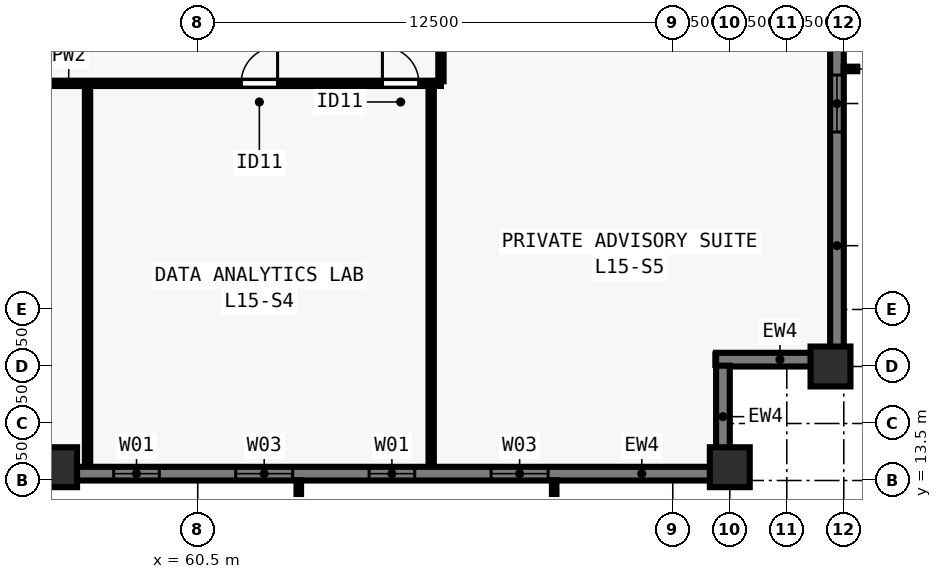
"""IFC4 building model, lengths in metres.
Left out: names, types, materials, properties, quantities, classifications, styles, units other than length and angle.
Written with IfcOpenShell. Run it as: python <this file> out.ifc"""

import sys

from ifc_helpers import new_model, si_unit, direction, frame, frame_2d, origin, origin_2d, place, context, subcontext, project, spatial, rectangle, extrude, element, fill, save


model = new_model("IFC4")
c1 = context("Model", 3, precision=1e-05, world=origin(), true_north=direction((0.0, 1.0)))
c2 = subcontext(c1, "Body", "Model", "MODEL_VIEW")
j1 = project(units=[si_unit("LENGTHUNIT", "METRE"), si_unit("PLANEANGLEUNIT", "RADIAN")], contexts=[c1])
p1 = place(None, origin())
s1 = spatial("IfcSite", under=j1, at=p1, CompositionType="ELEMENT")
p2 = place(p1, origin())
s2 = spatial("IfcBuilding", under=s1, at=p2, CompositionType="ELEMENT")
p3 = place(p2, frame((0.0, 0.0, 58.5)))
s3 = spatial("IfcBuildingStorey", under=s2, at=p3, CompositionType="ELEMENT", Elevation=58.5)
for number, where, z_axis, x_axis in (
    (1, (56.8, 13.85, 0.0), (0.0, 0.0, 1.0), (1.0, 0.0, 0.0)),
    (2, (74.5, 13.85, 0.0), (0.0, 0.0, 1.0), (1.0, 0.0, 0.0)),
    (3, (77.15, 16.5, 0.0), (0.0, 0.0, 1.0), (0.0, 1.0, 0.0)),
):
    element("IfcColumn", number, at=place(p3, frame(where, z_axis=z_axis, x_axis=x_axis)), inside=s3, PredefinedType="COLUMN", context=c2, shape_type="SweptSolid", body=[
        extrude(rectangle(XDim=1.05, YDim=1.05, at=origin_2d()), origin(), (0.0, 0.0, 1.0), 3.5),
    ])
p4 = place(p3, frame((77.32, 27.4, 0.0), z_axis=(0.0, 0.0, 1.0), x_axis=(0.0, -1.0, 0.0)))
e4 = element("IfcWall", 4, at=p4, inside=s3, PredefinedType="SOLIDWALL", context=c2, shape_type="SweptSolid", body=[
    extrude(rectangle(XDim=10.562, YDim=0.36, at=frame_2d((5.281, 0.0))), origin(), (0.0, 0.0, 1.0), 3.28),
])
p5 = place(p4, frame((3.231, 0.0, 0.8)))
e5 = element("IfcOpeningElement", 5, at=p5, cuts=e4, PredefinedType="OPENING", context=c2, shape_type="SweptSolid", body=[
    extrude(rectangle(XDim=1.5, YDim=1.544, at=frame_2d((0.75, 0.772))), frame((0.0, 0.19, 0.0), z_axis=(0.0, -1.0, 0.0), x_axis=(1.0, 0.0, 0.0)), (0.0, 0.0, 1.0), 0.38),
])
p6 = place(p3, frame((77.5, 16.68, 0.0), z_axis=(0.0, 0.0, 1.0), x_axis=(-1.0, 0.0, 0.0)))
e6 = element("IfcWall", 6, at=p6, inside=s3, PredefinedType="SOLIDWALL", context=c2, shape_type="SweptSolid", body=[
    extrude(rectangle(XDim=3.36, YDim=0.36, at=frame_2d((1.68, 0.0))), origin(), (0.0, 0.0, 1.0), 3.28),
])
p7 = place(p3, frame((74.32, 16.522, 0.0), z_axis=(0.0, 0.0, 1.0), x_axis=(0.0, -1.0, 0.0)))
e7 = element("IfcWall", 7, at=p7, inside=s3, PredefinedType="SOLIDWALL", context=c2, shape_type="SweptSolid", body=[
    extrude(rectangle(XDim=2.684, YDim=0.36, at=frame_2d((1.342, 0.0))), origin(), (0.0, 0.0, 1.0), 3.28),
])
p8 = place(p3, frame((74.5, 13.68, 0.0), z_axis=(0.0, 0.0, 1.0), x_axis=(-1.0, 0.0, 0.0)))
e8 = element("IfcWall", 8, at=p8, inside=s3, PredefinedType="SOLIDWALL", context=c2, shape_type="SweptSolid", body=[
    extrude(rectangle(XDim=44.662, YDim=0.36, at=frame_2d((22.331, 0.0))), origin(), (0.0, 0.0, 1.0), 3.28),
])
p9 = place(p8, frame((4.78, 0.0, 0.8)))
e9 = element("IfcOpeningElement", 9, at=p9, cuts=e8, PredefinedType="OPENING", context=c2, shape_type="SweptSolid", body=[
    extrude(rectangle(XDim=1.5, YDim=1.544, at=frame_2d((0.75, 0.772))), frame((0.0, 0.19, 0.0), z_axis=(0.0, -1.0, 0.0), x_axis=(1.0, 0.0, 0.0)), (0.0, 0.0, 1.0), 0.38),
])
p10 = place(p8, frame((8.29, 0.0, 0.8)))
e10 = element("IfcOpeningElement", 10, at=p10, cuts=e8, PredefinedType="OPENING", context=c2, shape_type="SweptSolid", body=[
    extrude(rectangle(XDim=1.2, YDim=1.544, at=frame_2d((0.6, 0.772))), frame((0.0, 0.19, 0.0), z_axis=(0.0, -1.0, 0.0), x_axis=(1.0, 0.0, 0.0)), (0.0, 0.0, 1.0), 0.38),
])
p11 = place(p8, frame((11.5, 0.0, 0.8)))
e11 = element("IfcOpeningElement", 11, at=p11, cuts=e8, PredefinedType="OPENING", context=c2, shape_type="SweptSolid", body=[
    extrude(rectangle(XDim=1.5, YDim=1.544, at=frame_2d((0.75, 0.772))), frame((0.0, 0.19, 0.0), z_axis=(0.0, -1.0, 0.0), x_axis=(1.0, 0.0, 0.0)), (0.0, 0.0, 1.0), 0.38),
])
p12 = place(p8, frame((15.01, 0.0, 0.8)))
e12 = element("IfcOpeningElement", 12, at=p12, cuts=e8, PredefinedType="OPENING", context=c2, shape_type="SweptSolid", body=[
    extrude(rectangle(XDim=1.2, YDim=1.544, at=frame_2d((0.6, 0.772))), frame((0.0, 0.19, 0.0), z_axis=(0.0, -1.0, 0.0), x_axis=(1.0, 0.0, 0.0)), (0.0, 0.0, 1.0), 0.38),
])
p13 = place(p8, frame((18.671, 0.0, 0.8)))
e13 = element("IfcOpeningElement", 13, at=p13, cuts=e8, PredefinedType="OPENING", context=c2, shape_type="SweptSolid", body=[
    extrude(rectangle(XDim=1.5, YDim=1.544, at=frame_2d((0.75, 0.772))), frame((0.0, 0.19, 0.0), z_axis=(0.0, -1.0, 0.0), x_axis=(1.0, 0.0, 0.0)), (0.0, 0.0, 1.0), 0.38),
])
p14 = place(p8, frame((21.731, 0.0, 0.8)))
e14 = element("IfcOpeningElement", 14, at=p14, cuts=e8, PredefinedType="OPENING", context=c2, shape_type="SweptSolid", body=[
    extrude(rectangle(XDim=1.2, YDim=1.544, at=frame_2d((0.6, 0.772))), frame((0.0, 0.19, 0.0), z_axis=(0.0, -1.0, 0.0), x_axis=(1.0, 0.0, 0.0)), (0.0, 0.0, 1.0), 0.38),
])
p15 = place(p8, frame((24.941, 0.0, 0.8)))
e15 = element("IfcOpeningElement", 15, at=p15, cuts=e8, PredefinedType="OPENING", context=c2, shape_type="SweptSolid", body=[
    extrude(rectangle(XDim=1.5, YDim=1.544, at=frame_2d((0.75, 0.772))), frame((0.0, 0.19, 0.0), z_axis=(0.0, -1.0, 0.0), x_axis=(1.0, 0.0, 0.0)), (0.0, 0.0, 1.0), 0.38),
])
p16 = place(p8, frame((28.451, 0.0, 0.8)))
e16 = element("IfcOpeningElement", 16, at=p16, cuts=e8, PredefinedType="OPENING", context=c2, shape_type="SweptSolid", body=[
    extrude(rectangle(XDim=1.2, YDim=1.544, at=frame_2d((0.6, 0.772))), frame((0.0, 0.19, 0.0), z_axis=(0.0, -1.0, 0.0), x_axis=(1.0, 0.0, 0.0)), (0.0, 0.0, 1.0), 0.38),
])
p17 = place(p8, frame((31.662, 0.0, 0.8)))
e17 = element("IfcOpeningElement", 17, at=p17, cuts=e8, PredefinedType="OPENING", context=c2, shape_type="SweptSolid", body=[
    extrude(rectangle(XDim=1.5, YDim=1.544, at=frame_2d((0.75, 0.772))), frame((0.0, 0.19, 0.0), z_axis=(0.0, -1.0, 0.0), x_axis=(1.0, 0.0, 0.0)), (0.0, 0.0, 1.0), 0.38),
])
p18 = place(p8, frame((35.172, 0.0, 0.8)))
e18 = element("IfcOpeningElement", 18, at=p18, cuts=e8, PredefinedType="OPENING", context=c2, shape_type="SweptSolid", body=[
    extrude(rectangle(XDim=1.2, YDim=1.544, at=frame_2d((0.6, 0.772))), frame((0.0, 0.19, 0.0), z_axis=(0.0, -1.0, 0.0), x_axis=(1.0, 0.0, 0.0)), (0.0, 0.0, 1.0), 0.38),
])
p19 = place(p8, frame((38.382, 0.0, 0.8)))
e19 = element("IfcOpeningElement", 19, at=p19, cuts=e8, PredefinedType="OPENING", context=c2, shape_type="SweptSolid", body=[
    extrude(rectangle(XDim=1.5, YDim=1.544, at=frame_2d((0.75, 0.772))), frame((0.0, 0.19, 0.0), z_axis=(0.0, -1.0, 0.0), x_axis=(1.0, 0.0, 0.0)), (0.0, 0.0, 1.0), 0.38),
])
p20 = place(p3, frame((37.1, 23.95, 0.0), z_axis=(0.0, 0.0, 1.0), x_axis=(1.0, 0.0, 0.0)))
e20 = element("IfcWall", 20, at=p20, inside=s3, PredefinedType="PARTITIONING", context=c2, shape_type="SweptSolid", body=[
    extrude(rectangle(XDim=29.8, YDim=0.14, at=frame_2d((14.9, 0.0))), origin(), (0.0, 0.0, 1.0), 3.28),
])
p21 = place(p20, frame((4.191, 0.0, 0.0)))
e21 = element("IfcOpeningElement", 21, at=p21, cuts=e20, PredefinedType="OPENING", context=c2, shape_type="SweptSolid", body=[
    extrude(rectangle(XDim=0.96, YDim=2.12, at=frame_2d((0.48, 1.06))), frame((0.0, 0.08, 0.0), z_axis=(0.0, -1.0, 0.0), x_axis=(1.0, 0.0, 0.0)), (0.0, 0.0, 1.0), 0.16),
])
p22 = place(p20, frame((5.358, 0.0, 0.0)))
e22 = element("IfcOpeningElement", 22, at=p22, cuts=e20, PredefinedType="OPENING", context=c2, shape_type="SweptSolid", body=[
    extrude(rectangle(XDim=0.96, YDim=2.12, at=frame_2d((0.48, 1.06))), frame((0.0, 0.08, 0.0), z_axis=(0.0, -1.0, 0.0), x_axis=(1.0, 0.0, 0.0)), (0.0, 0.0, 1.0), 0.16),
])
p23 = place(p20, frame((14.51, 0.0, 0.0)))
e23 = element("IfcOpeningElement", 23, at=p23, cuts=e20, PredefinedType="OPENING", context=c2, shape_type="SweptSolid", body=[
    extrude(rectangle(XDim=0.96, YDim=2.12, at=frame_2d((0.48, 1.06))), frame((0.0, 0.08, 0.0), z_axis=(0.0, -1.0, 0.0), x_axis=(1.0, 0.0, 0.0)), (0.0, 0.0, 1.0), 0.16),
])
p24 = place(p20, frame((24.542, 0.0, 0.0)))
e24 = element("IfcOpeningElement", 24, at=p24, cuts=e20, PredefinedType="OPENING", context=c2, shape_type="SweptSolid", body=[
    extrude(rectangle(XDim=0.96, YDim=2.12, at=frame_2d((0.48, 1.06))), frame((0.0, 0.08, 0.0), z_axis=(0.0, -1.0, 0.0), x_axis=(1.0, 0.0, 0.0)), (0.0, 0.0, 1.0), 0.16),
])
p25 = place(p20, frame((28.26, 0.0, 0.0)))
e25 = element("IfcOpeningElement", 25, at=p25, cuts=e20, PredefinedType="OPENING", context=c2, shape_type="SweptSolid", body=[
    extrude(rectangle(XDim=0.96, YDim=2.12, at=frame_2d((0.48, 1.06))), frame((0.0, 0.08, 0.0), z_axis=(0.0, -1.0, 0.0), x_axis=(1.0, 0.0, 0.0)), (0.0, 0.0, 1.0), 0.16),
])
p26 = place(p3, frame((66.9, 24.005, 0.0), z_axis=(0.0, 0.0, 1.0), x_axis=(0.0, 1.0, 0.0)))
e26 = element("IfcWall", 26, at=p26, inside=s3, PredefinedType="PARTITIONING", context=c2, shape_type="SweptSolid", body=[
    extrude(rectangle(XDim=29.99, YDim=0.14, at=frame_2d((14.995, 0.0))), origin(), (0.0, 0.0, 1.0), 3.28),
])
p27 = place(p26, frame((4.344, 0.0, 0.0)))
e27 = element("IfcOpeningElement", 27, at=p27, cuts=e26, PredefinedType="OPENING", context=c2, shape_type="SweptSolid", body=[
    extrude(rectangle(XDim=0.96, YDim=2.12, at=frame_2d((0.48, 1.06))), frame((0.0, 0.08, 0.0), z_axis=(0.0, -1.0, 0.0), x_axis=(1.0, 0.0, 0.0)), (0.0, 0.0, 1.0), 0.16),
])
p28 = place(p26, frame((14.452, 0.0, 0.0)))
e28 = element("IfcOpeningElement", 28, at=p28, cuts=e26, PredefinedType="OPENING", context=c2, shape_type="SweptSolid", body=[
    extrude(rectangle(XDim=0.96, YDim=2.12, at=frame_2d((0.48, 1.06))), frame((0.0, 0.08, 0.0), z_axis=(0.0, -1.0, 0.0), x_axis=(1.0, 0.0, 0.0)), (0.0, 0.0, 1.0), 0.16),
])
p29 = place(p26, frame((24.623, 0.0, 0.0)))
e29 = element("IfcOpeningElement", 29, at=p29, cuts=e26, PredefinedType="OPENING", context=c2, shape_type="SweptSolid", body=[
    extrude(rectangle(XDim=0.96, YDim=2.12, at=frame_2d((0.48, 1.06))), frame((0.0, 0.08, 0.0), z_axis=(0.0, -1.0, 0.0), x_axis=(1.0, 0.0, 0.0)), (0.0, 0.0, 1.0), 0.16),
])
p30 = place(p3, frame((57.601, 13.92, 0.0), z_axis=(0.0, 0.0, 1.0), x_axis=(0.0, 1.0, 0.0)))
e30 = element("IfcWall", 30, at=p30, inside=s3, PredefinedType="PARTITIONING", context=c2, shape_type="SweptSolid", body=[
    extrude(rectangle(XDim=9.93, YDim=0.14, at=frame_2d((4.965, 0.0))), origin(), (0.0, 0.0, 1.0), 3.28),
])
p31 = place(p3, frame((66.643, 13.92, 0.0), z_axis=(0.0, 0.0, 1.0), x_axis=(0.0, 1.0, 0.0)))
e31 = element("IfcWall", 31, at=p31, inside=s3, PredefinedType="PARTITIONING", context=c2, shape_type="SweptSolid", body=[
    extrude(rectangle(XDim=9.93, YDim=0.14, at=frame_2d((4.965, 0.0))), origin(), (0.0, 0.0, 1.0), 2.439),
])
p32 = place(p5, origin())
e32 = element("IfcWindow", 32, at=p32, inside=s3, PartitioningType="SINGLE_PANEL", PredefinedType="WINDOW", context=c2, shape_type="SweptSolid", body=[
    extrude(rectangle(XDim=1.5, YDim=1.544, at=frame_2d((0.75, 0.772))), frame((0.0, -0.05, 0.0), z_axis=(0.0, -1.0, 0.0), x_axis=(1.0, 0.0, 0.0)), (0.0, 0.0, 1.0), 0.06),
])
fill(e5, e32)
p33 = place(p9, origin())
e33 = element("IfcWindow", 33, at=p33, inside=s3, PartitioningType="SINGLE_PANEL", PredefinedType="WINDOW", context=c2, shape_type="SweptSolid", body=[
    extrude(rectangle(XDim=1.5, YDim=1.544, at=frame_2d((0.75, 0.772))), frame((0.0, -0.05, 0.0), z_axis=(0.0, -1.0, 0.0), x_axis=(1.0, 0.0, 0.0)), (0.0, 0.0, 1.0), 0.06),
])
fill(e9, e33)
p34 = place(p10, origin())
e34 = element("IfcWindow", 34, at=p34, inside=s3, PartitioningType="SINGLE_PANEL", PredefinedType="WINDOW", context=c2, shape_type="SweptSolid", body=[
    extrude(rectangle(XDim=1.2, YDim=1.544, at=frame_2d((0.6, 0.772))), frame((0.0, -0.05, 0.0), z_axis=(0.0, -1.0, 0.0), x_axis=(1.0, 0.0, 0.0)), (0.0, 0.0, 1.0), 0.06),
])
fill(e10, e34)
p35 = place(p11, origin())
e35 = element("IfcWindow", 35, at=p35, inside=s3, PartitioningType="SINGLE_PANEL", PredefinedType="WINDOW", context=c2, shape_type="SweptSolid", body=[
    extrude(rectangle(XDim=1.5, YDim=1.544, at=frame_2d((0.75, 0.772))), frame((0.0, -0.05, 0.0), z_axis=(0.0, -1.0, 0.0), x_axis=(1.0, 0.0, 0.0)), (0.0, 0.0, 1.0), 0.06),
])
fill(e11, e35)
p36 = place(p12, origin())
e36 = element("IfcWindow", 36, at=p36, inside=s3, PartitioningType="SINGLE_PANEL", PredefinedType="WINDOW", context=c2, shape_type="SweptSolid", body=[
    extrude(rectangle(XDim=1.2, YDim=1.544, at=frame_2d((0.6, 0.772))), frame((0.0, -0.05, 0.0), z_axis=(0.0, -1.0, 0.0), x_axis=(1.0, 0.0, 0.0)), (0.0, 0.0, 1.0), 0.06),
])
fill(e12, e36)
p37 = place(p24, origin())
e37 = element("IfcDoor", 37, at=p37, inside=s3, OperationType="SINGLE_SWING_RIGHT", PredefinedType="DOOR", context=c2, shape_type="SweptSolid", body=[
    extrude(rectangle(XDim=0.96, YDim=2.12, at=frame_2d((0.48, 1.06))), frame((0.0, 0.025, 0.0), z_axis=(0.0, -1.0, 0.0), x_axis=(1.0, 0.0, 0.0)), (0.0, 0.0, 1.0), 0.05),
])
fill(e24, e37)
p38 = place(p25, origin())
e38 = element("IfcDoor", 38, at=p38, inside=s3, OperationType="SINGLE_SWING_LEFT", PredefinedType="DOOR", context=c2, shape_type="SweptSolid", body=[
    extrude(rectangle(XDim=0.96, YDim=2.12, at=frame_2d((0.48, 1.06))), frame((0.0, 0.025, 0.0), z_axis=(0.0, -1.0, 0.0), x_axis=(1.0, 0.0, 0.0)), (0.0, 0.0, 1.0), 0.05),
])
fill(e25, e38)
save(model, sys.argv[1])
